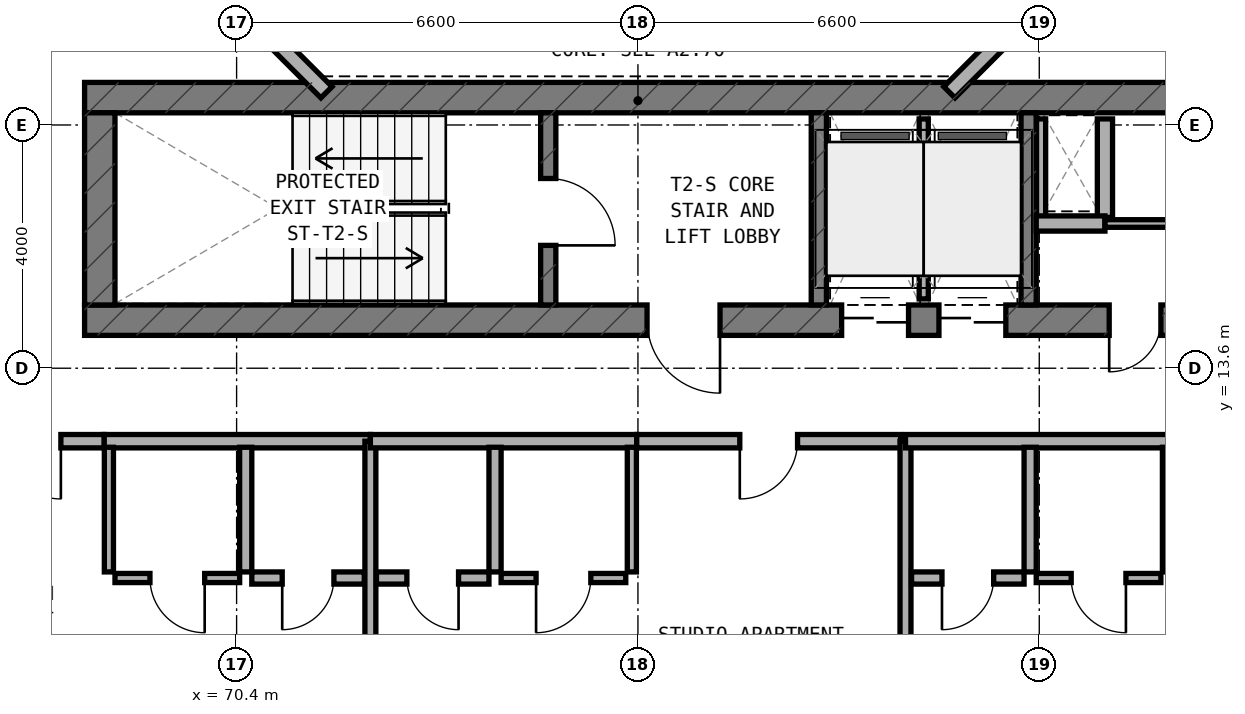
"""IFC4 building model, lengths in metres.
Left out: names, types, materials, properties, quantities, classifications, styles, units other than length and angle.
Written with IfcOpenShell. Run it as: python <this file> out.ifc"""

import sys

from ifc_helpers import new_model, si_unit, direction, frame, frame_2d, origin, place, context, subcontext, project, spatial, rectangle, extrude, element, fill, save


model = new_model("IFC4")
c1 = context("Model", 3, precision=1e-05, world=origin(), true_north=direction((0.0, 1.0)))
c2 = subcontext(c1, "Body", "Model", "MODEL_VIEW")
j1 = project(units=[si_unit("LENGTHUNIT", "METRE"), si_unit("PLANEANGLEUNIT", "RADIAN")], contexts=[c1])
p1 = place(None, origin())
s1 = spatial("IfcSite", under=j1, at=p1, CompositionType="ELEMENT")
p2 = place(p1, origin())
s2 = spatial("IfcBuilding", under=s1, at=p2, CompositionType="ELEMENT")
p3 = place(p2, frame((0.0, 0.0, 80.0)))
s3 = spatial("IfcBuildingStorey", under=s2, at=p3, CompositionType="ELEMENT", Elevation=80.0)
p4 = place(p3, frame((67.9, 14.39, 0.0), z_axis=(0.0, 0.0, 1.0), x_axis=(1.0, 0.0, 0.0)))
e1 = element("IfcWall", 1, at=p4, inside=s3, PredefinedType="SHEAR", context=c2, shape_type="SweptSolid", body=[
    extrude(rectangle(XDim=18.4, YDim=0.5, at=frame_2d((9.2, 0.0))), origin(), (0.0, 0.0, 1.0), 3.5),
])
p5 = place(p4, frame((9.25, 0.0, 0.0)))
e2 = element("IfcOpeningElement", 2, at=p5, cuts=e1, PredefinedType="OPENING", context=c2, shape_type="SweptSolid", body=[
    extrude(rectangle(XDim=1.2, YDim=2.15, at=frame_2d((0.6, 1.075))), frame((0.0, 0.26, 0.0), z_axis=(0.0, -1.0, 0.0), x_axis=(1.0, 0.0, 0.0)), (0.0, 0.0, 1.0), 0.52),
])
p6 = place(p4, frame((16.85, 0.0, 0.0)))
e3 = element("IfcOpeningElement", 3, at=p6, cuts=e1, PredefinedType="OPENING", context=c2, shape_type="SweptSolid", body=[
    extrude(rectangle(XDim=0.85, YDim=2.1, at=frame_2d((0.425, 1.05))), frame((0.0, 0.26, 0.0), z_axis=(0.0, -1.0, 0.0), x_axis=(1.0, 0.0, 0.0)), (0.0, 0.0, 1.0), 0.52),
])
p7 = place(p4, frame((12.45, 0.0, 0.0)))
e4 = element("IfcOpeningElement", 4, at=p7, cuts=e1, PredefinedType="OPENING", context=c2, shape_type="SweptSolid", body=[
    extrude(rectangle(XDim=1.1, YDim=2.15, at=frame_2d((0.55, 1.075))), frame((0.0, 0.26, 0.0), z_axis=(0.0, -1.0, 0.0), x_axis=(1.0, 0.0, 0.0)), (0.0, 0.0, 1.0), 0.52),
])
p8 = place(p4, frame((14.05, 0.0, 0.0)))
e5 = element("IfcOpeningElement", 5, at=p8, cuts=e1, PredefinedType="OPENING", context=c2, shape_type="SweptSolid", body=[
    extrude(rectangle(XDim=1.1, YDim=2.15, at=frame_2d((0.55, 1.075))), frame((0.0, 0.26, 0.0), z_axis=(0.0, -1.0, 0.0), x_axis=(1.0, 0.0, 0.0)), (0.0, 0.0, 1.0), 0.52),
])
p9 = place(p3, frame((67.9, 18.05, 0.0), z_axis=(0.0, 0.0, 1.0), x_axis=(1.0, 0.0, 0.0)))
e6 = element("IfcWall", 6, at=p9, inside=s3, PredefinedType="SHEAR", context=c2, shape_type="SweptSolid", body=[
    extrude(rectangle(XDim=18.4, YDim=0.5, at=frame_2d((9.2, 0.0))), origin(), (0.0, 0.0, 1.0), 3.5),
])
p10 = place(p3, frame((68.15, 14.64, 0.0), z_axis=(0.0, 0.0, 1.0), x_axis=(0.0, 1.0, 0.0)))
e7 = element("IfcWall", 7, at=p10, inside=s3, PredefinedType="SHEAR", context=c2, shape_type="SweptSolid", body=[
    extrude(rectangle(XDim=3.16, YDim=0.5, at=frame_2d((1.58, 0.0))), origin(), (0.0, 0.0, 1.0), 3.5),
])
p11 = place(p3, frame((75.525, 14.64, 0.0), z_axis=(0.0, 0.0, 1.0), x_axis=(0.0, 1.0, 0.0)))
e8 = element("IfcWall", 8, at=p11, inside=s3, PredefinedType="STANDARD", context=c2, shape_type="SweptSolid", body=[
    extrude(rectangle(XDim=3.16, YDim=0.25, at=frame_2d((1.58, 0.0))), origin(), (0.0, 0.0, 1.0), 3.25),
])
p12 = place(p11, frame((0.98, 0.0, 0.0)))
e9 = element("IfcOpeningElement", 9, at=p12, cuts=e8, PredefinedType="OPENING", context=c2, shape_type="SweptSolid", body=[
    extrude(rectangle(XDim=1.1, YDim=2.15, at=frame_2d((0.55, 1.075))), frame((0.0, 0.135, 0.0), z_axis=(0.0, -1.0, 0.0), x_axis=(1.0, 0.0, 0.0)), (0.0, 0.0, 1.0), 0.27),
])
for number, where, z_axis, x_axis in (
    (10, (79.975, 14.64, 0.0), (0.0, 0.0, 1.0), (0.0, 1.0, 0.0)),
    (11, (83.425, 14.64, 0.0), (0.0, 0.0, 1.0), (0.0, 1.0, 0.0)),
):
    element("IfcWall", number, at=place(p3, frame(where, z_axis=z_axis, x_axis=x_axis)), inside=s3, PredefinedType="STANDARD", context=c2, shape_type="SweptSolid", body=[
        extrude(rectangle(XDim=3.16, YDim=0.25, at=frame_2d((1.58, 0.0))), origin(), (0.0, 0.0, 1.0), 3.25),
    ])
for number, where, z_axis, x_axis in (
    (12, (82.122, 18.138, 0.0), (0.0, 0.0, 1.0), (0.707, 0.707, 0.0)),
    (13, (70.244, 19.772, 0.0), (0.0, 0.0, 1.0), (0.707, -0.707, 0.0)),
):
    element("IfcWall", number, at=place(p3, frame(where, z_axis=z_axis, x_axis=x_axis)), inside=s3, PredefinedType="STANDARD", context=c2, shape_type="SweptSolid", body=[
        extrude(rectangle(XDim=2.311, YDim=0.26, at=frame_2d((1.155, 0.0))), origin(), (0.0, 0.0, 1.0), 3.25),
    ])
p13 = place(p3, frame((83.63, 16.08, 0.0), z_axis=(0.0, 0.0, 1.0), x_axis=(0.0, 1.0, 0.0)))
e14 = element("IfcWall", 14, at=p13, inside=s3, PredefinedType="PARTITIONING", context=c2, shape_type="SweptSolid", body=[
    extrude(rectangle(XDim=1.62, YDim=0.15, at=frame_2d((0.81, 0.0))), origin(), (0.0, 0.0, 1.0), 2.825),
])
p14 = place(p3, frame((84.68, 16.08, 0.0), z_axis=(0.0, 0.0, 1.0), x_axis=(0.0, 1.0, 0.0)))
e15 = element("IfcWall", 15, at=p14, inside=s3, PredefinedType="SOLIDWALL", context=c2, shape_type="SweptSolid", body=[
    extrude(rectangle(XDim=1.62, YDim=0.25, at=frame_2d((0.81, 0.0))), origin(), (0.0, 0.0, 1.0), 3.22),
])
p15 = place(p3, frame((83.55, 15.98, 0.0), z_axis=(0.0, 0.0, 1.0), x_axis=(1.0, 0.0, 0.0)))
e16 = element("IfcWall", 16, at=p15, inside=s3, PredefinedType="SOLIDWALL", context=c2, shape_type="SweptSolid", body=[
    extrude(rectangle(XDim=1.13, YDim=0.25, at=frame_2d((0.565, 0.0))), origin(), (0.0, 0.0, 1.0), 3.22),
])
p16 = place(p3, frame((84.68, 15.98, 0.0), z_axis=(0.0, 0.0, 1.0), x_axis=(1.0, 0.0, 0.0)))
e17 = element("IfcWall", 17, at=p16, inside=s3, PredefinedType="PARTITIONING", context=c2, shape_type="SweptSolid", body=[
    extrude(rectangle(XDim=1.12, YDim=0.125, at=frame_2d((0.56, 0.0))), origin(), (0.0, 0.0, 1.0), 3.22),
])
p17 = place(p3, frame((81.7, 14.74, 0.0), z_axis=(0.0, 0.0, 1.0), x_axis=(0.0, 1.0, 0.0)))
e18 = element("IfcWall", 18, at=p17, inside=s3, PredefinedType="PARTITIONING", context=c2, shape_type="SweptSolid", body=[
    extrude(rectangle(XDim=2.96, YDim=0.15, at=frame_2d((1.48, 0.0))), origin(), (0.0, 0.0, 1.0), 3.22),
])
p18 = place(p3, frame((68.22, 12.4, 0.0), z_axis=(0.0, 0.0, 1.0), x_axis=(1.0, 0.0, 0.0)))
e19 = element("IfcWall", 19, at=p18, inside=s3, PredefinedType="SOLIDWALL", context=c2, shape_type="SweptSolid", body=[
    extrude(rectangle(XDim=4.38, YDim=0.22, at=frame_2d((2.19, 0.0))), origin(), (0.0, 0.0, 1.0), 2.825),
])
p19 = place(p3, frame((65.85, 12.4, 0.0), z_axis=(0.0, 0.0, 1.0), x_axis=(1.0, 0.0, 0.0)))
e20 = element("IfcWall", 20, at=p19, inside=s3, PredefinedType="SOLIDWALL", context=c2, shape_type="SweptSolid", body=[
    extrude(rectangle(XDim=2.37, YDim=0.22, at=frame_2d((1.185, 0.0))), origin(), (0.0, 0.0, 1.0), 3.22),
])
p20 = place(p19, frame((0.71, 0.0, 0.0)))
e21 = element("IfcOpeningElement", 21, at=p20, cuts=e20, PredefinedType="OPENING", context=c2, shape_type="SweptSolid", body=[
    extrude(rectangle(XDim=0.95, YDim=2.1, at=frame_2d((0.475, 1.05))), frame((0.0, 0.12, 0.0), z_axis=(0.0, -1.0, 0.0), x_axis=(1.0, 0.0, 0.0)), (0.0, 0.0, 1.0), 0.24),
])
p21 = place(p3, frame((70.55, 10.25, 0.0), z_axis=(0.0, 0.0, 1.0), x_axis=(0.0, 1.0, 0.0)))
e22 = element("IfcWall", 22, at=p21, inside=s3, PredefinedType="PLUMBINGWALL", context=c2, shape_type="SweptSolid", body=[
    extrude(rectangle(XDim=2.05, YDim=0.2, at=frame_2d((1.025, 0.0))), origin(), (0.0, 0.0, 1.0), 3.22),
])
p22 = place(p3, frame((68.3, 10.25, 0.0), z_axis=(0.0, 0.0, 1.0), x_axis=(0.0, 1.0, 0.0)))
e23 = element("IfcWall", 23, at=p22, inside=s3, PredefinedType="PARTITIONING", context=c2, shape_type="SweptSolid", body=[
    extrude(rectangle(XDim=2.05, YDim=0.15, at=frame_2d((1.025, 0.0))), origin(), (0.0, 0.0, 1.0), 3.22),
])
p23 = place(p3, frame((70.65, 10.15, 0.0), z_axis=(0.0, 0.0, 1.0), x_axis=(1.0, 0.0, 0.0)))
e24 = element("IfcWall", 24, at=p23, inside=s3, PredefinedType="PLUMBINGWALL", context=c2, shape_type="SweptSolid", body=[
    extrude(rectangle(XDim=1.85, YDim=0.2, at=frame_2d((0.925, 0.0))), origin(), (0.0, 0.0, 1.0), 3.22),
])
p24 = place(p23, frame((0.5, 0.0, 0.0)))
e25 = element("IfcOpeningElement", 25, at=p24, cuts=e24, PredefinedType="OPENING", context=c2, shape_type="SweptSolid", body=[
    extrude(rectangle(XDim=0.85, YDim=2.1, at=frame_2d((0.425, 1.05))), frame((0.0, 0.11, 0.0), z_axis=(0.0, -1.0, 0.0), x_axis=(1.0, 0.0, 0.0)), (0.0, 0.0, 1.0), 0.22),
])
p25 = place(p3, frame((68.4, 10.15, 0.0), z_axis=(0.0, 0.0, 1.0), x_axis=(1.0, 0.0, 0.0)))
e26 = element("IfcWall", 26, at=p25, inside=s3, PredefinedType="PARTITIONING", context=c2, shape_type="SweptSolid", body=[
    extrude(rectangle(XDim=2.05, YDim=0.15, at=frame_2d((1.025, 0.0))), origin(), (0.0, 0.0, 1.0), 3.22),
])
p26 = place(p25, frame((0.575, 0.0, 0.0)))
e27 = element("IfcOpeningElement", 27, at=p26, cuts=e26, PredefinedType="OPENING", context=c2, shape_type="SweptSolid", body=[
    extrude(rectangle(XDim=0.9, YDim=2.1, at=frame_2d((0.45, 1.05))), frame((0.0, 0.085, 0.0), z_axis=(0.0, -1.0, 0.0), x_axis=(1.0, 0.0, 0.0)), (0.0, 0.0, 1.0), 0.17),
])
p27 = place(p3, frame((72.6, 6.66, 0.0), z_axis=(0.0, 0.0, 1.0), x_axis=(0.0, 1.0, 0.0)))
e28 = element("IfcWall", 28, at=p27, inside=s3, PredefinedType="SOLIDWALL", context=c2, shape_type="SweptSolid", body=[
    extrude(rectangle(XDim=5.74, YDim=0.18, at=frame_2d((2.87, 0.0))), origin(), (0.0, 0.0, 1.0), 2.825),
])
p28 = place(p3, frame((72.6, 12.4, 0.0), z_axis=(0.0, 0.0, 1.0), x_axis=(1.0, 0.0, 0.0)))
e29 = element("IfcWall", 29, at=p28, inside=s3, PredefinedType="SOLIDWALL", context=c2, shape_type="SweptSolid", body=[
    extrude(rectangle(XDim=4.38, YDim=0.22, at=frame_2d((2.19, 0.0))), origin(), (0.0, 0.0, 1.0), 2.825),
])
p29 = place(p3, frame((76.98, 12.4, 0.0), z_axis=(0.0, 0.0, 1.0), x_axis=(1.0, 0.0, 0.0)))
e30 = element("IfcWall", 30, at=p29, inside=s3, PredefinedType="SOLIDWALL", context=c2, shape_type="SweptSolid", body=[
    extrude(rectangle(XDim=4.34, YDim=0.22, at=frame_2d((2.17, 0.0))), origin(), (0.0, 0.0, 1.0), 2.825),
])
p30 = place(p29, frame((1.695, 0.0, 0.0)))
e31 = element("IfcOpeningElement", 31, at=p30, cuts=e30, PredefinedType="OPENING", context=c2, shape_type="SweptSolid", body=[
    extrude(rectangle(XDim=0.95, YDim=2.1, at=frame_2d((0.475, 1.05))), frame((0.0, 0.12, 0.0), z_axis=(0.0, -1.0, 0.0), x_axis=(1.0, 0.0, 0.0)), (0.0, 0.0, 1.0), 0.24),
])
p31 = place(p3, frame((74.65, 10.25, 0.0), z_axis=(0.0, 0.0, 1.0), x_axis=(0.0, 1.0, 0.0)))
e32 = element("IfcWall", 32, at=p31, inside=s3, PredefinedType="PLUMBINGWALL", context=c2, shape_type="SweptSolid", body=[
    extrude(rectangle(XDim=2.05, YDim=0.2, at=frame_2d((1.025, 0.0))), origin(), (0.0, 0.0, 1.0), 2.825),
])
p32 = place(p3, frame((76.9, 10.25, 0.0), z_axis=(0.0, 0.0, 1.0), x_axis=(0.0, 1.0, 0.0)))
e33 = element("IfcWall", 33, at=p32, inside=s3, PredefinedType="PARTITIONING", context=c2, shape_type="SweptSolid", body=[
    extrude(rectangle(XDim=2.05, YDim=0.15, at=frame_2d((1.025, 0.0))), origin(), (0.0, 0.0, 1.0), 2.825),
])
p33 = place(p3, frame((72.7, 10.15, 0.0), z_axis=(0.0, 0.0, 1.0), x_axis=(1.0, 0.0, 0.0)))
e34 = element("IfcWall", 34, at=p33, inside=s3, PredefinedType="PLUMBINGWALL", context=c2, shape_type="SweptSolid", body=[
    extrude(rectangle(XDim=1.85, YDim=0.2, at=frame_2d((0.925, 0.0))), origin(), (0.0, 0.0, 1.0), 3.22),
])
p34 = place(p33, frame((0.5, 0.0, 0.0)))
e35 = element("IfcOpeningElement", 35, at=p34, cuts=e34, PredefinedType="OPENING", context=c2, shape_type="SweptSolid", body=[
    extrude(rectangle(XDim=0.85, YDim=2.1, at=frame_2d((0.425, 1.05))), frame((0.0, 0.11, 0.0), z_axis=(0.0, -1.0, 0.0), x_axis=(1.0, 0.0, 0.0)), (0.0, 0.0, 1.0), 0.22),
])
p35 = place(p3, frame((74.75, 10.15, 0.0), z_axis=(0.0, 0.0, 1.0), x_axis=(1.0, 0.0, 0.0)))
e36 = element("IfcWall", 36, at=p35, inside=s3, PredefinedType="PARTITIONING", context=c2, shape_type="SweptSolid", body=[
    extrude(rectangle(XDim=2.05, YDim=0.15, at=frame_2d((1.025, 0.0))), origin(), (0.0, 0.0, 1.0), 3.22),
])
p36 = place(p35, frame((0.575, 0.0, 0.0)))
e37 = element("IfcOpeningElement", 37, at=p36, cuts=e36, PredefinedType="OPENING", context=c2, shape_type="SweptSolid", body=[
    extrude(rectangle(XDim=0.9, YDim=2.1, at=frame_2d((0.45, 1.05))), frame((0.0, 0.085, 0.0), z_axis=(0.0, -1.0, 0.0), x_axis=(1.0, 0.0, 0.0)), (0.0, 0.0, 1.0), 0.17),
])
p37 = place(p3, frame((81.4, 6.66, 0.0), z_axis=(0.0, 0.0, 1.0), x_axis=(0.0, 1.0, 0.0)))
e38 = element("IfcWall", 38, at=p37, inside=s3, PredefinedType="SOLIDWALL", context=c2, shape_type="SweptSolid", body=[
    extrude(rectangle(XDim=5.74, YDim=0.18, at=frame_2d((2.87, 0.0))), origin(), (0.0, 0.0, 1.0), 2.825),
])
p38 = place(p3, frame((81.4, 12.4, 0.0), z_axis=(0.0, 0.0, 1.0), x_axis=(1.0, 0.0, 0.0)))
e39 = element("IfcWall", 39, at=p38, inside=s3, PredefinedType="SOLIDWALL", context=c2, shape_type="SweptSolid", body=[
    extrude(rectangle(XDim=4.38, YDim=0.22, at=frame_2d((2.19, 0.0))), origin(), (0.0, 0.0, 1.0), 2.825),
])
p39 = place(p3, frame((83.45, 10.25, 0.0), z_axis=(0.0, 0.0, 1.0), x_axis=(0.0, 1.0, 0.0)))
e40 = element("IfcWall", 40, at=p39, inside=s3, PredefinedType="PLUMBINGWALL", context=c2, shape_type="SweptSolid", body=[
    extrude(rectangle(XDim=2.05, YDim=0.2, at=frame_2d((1.025, 0.0))), origin(), (0.0, 0.0, 1.0), 3.22),
])
p40 = place(p3, frame((85.7, 10.25, 0.0), z_axis=(0.0, 0.0, 1.0), x_axis=(0.0, 1.0, 0.0)))
e41 = element("IfcWall", 41, at=p40, inside=s3, PredefinedType="PARTITIONING", context=c2, shape_type="SweptSolid", body=[
    extrude(rectangle(XDim=2.05, YDim=0.15, at=frame_2d((1.025, 0.0))), origin(), (0.0, 0.0, 1.0), 3.22),
])
p41 = place(p3, frame((81.5, 10.15, 0.0), z_axis=(0.0, 0.0, 1.0), x_axis=(1.0, 0.0, 0.0)))
e42 = element("IfcWall", 42, at=p41, inside=s3, PredefinedType="PLUMBINGWALL", context=c2, shape_type="SweptSolid", body=[
    extrude(rectangle(XDim=1.85, YDim=0.2, at=frame_2d((0.925, 0.0))), origin(), (0.0, 0.0, 1.0), 2.825),
])
p42 = place(p41, frame((0.5, 0.0, 0.0)))
e43 = element("IfcOpeningElement", 43, at=p42, cuts=e42, PredefinedType="OPENING", context=c2, shape_type="SweptSolid", body=[
    extrude(rectangle(XDim=0.85, YDim=2.1, at=frame_2d((0.425, 1.05))), frame((0.0, 0.11, 0.0), z_axis=(0.0, -1.0, 0.0), x_axis=(1.0, 0.0, 0.0)), (0.0, 0.0, 1.0), 0.22),
])
p43 = place(p3, frame((83.55, 10.15, 0.0), z_axis=(0.0, 0.0, 1.0), x_axis=(1.0, 0.0, 0.0)))
e44 = element("IfcWall", 44, at=p43, inside=s3, PredefinedType="PARTITIONING", context=c2, shape_type="SweptSolid", body=[
    extrude(rectangle(XDim=2.05, YDim=0.15, at=frame_2d((1.025, 0.0))), origin(), (0.0, 0.0, 1.0), 3.22),
])
p44 = place(p43, frame((0.575, 0.0, 0.0)))
e45 = element("IfcOpeningElement", 45, at=p44, cuts=e44, PredefinedType="OPENING", context=c2, shape_type="SweptSolid", body=[
    extrude(rectangle(XDim=0.9, YDim=2.1, at=frame_2d((0.45, 1.05))), frame((0.0, 0.085, 0.0), z_axis=(0.0, -1.0, 0.0), x_axis=(1.0, 0.0, 0.0)), (0.0, 0.0, 1.0), 0.17),
])
p45 = place(p12, frame((1.1, 0.0, 0.0), z_axis=(0.0, 0.0, 1.0), x_axis=(-1.0, 0.0, 0.0)))
e46 = element("IfcDoor", 46, at=p45, inside=s3, OperationType="SINGLE_SWING_RIGHT", PredefinedType="DOOR", context=c2, shape_type="SweptSolid", body=[
    extrude(rectangle(XDim=1.1, YDim=2.15, at=frame_2d((0.55, 1.075))), frame((0.0, 0.025, 0.0), z_axis=(0.0, -1.0, 0.0), x_axis=(1.0, 0.0, 0.0)), (0.0, 0.0, 1.0), 0.05),
])
fill(e9, e46)
p46 = place(p5, frame((1.2, 0.0, 0.0), z_axis=(0.0, 0.0, 1.0), x_axis=(-1.0, 0.0, 0.0)))
e47 = element("IfcDoor", 47, at=p46, inside=s3, OperationType="SINGLE_SWING_LEFT", PredefinedType="DOOR", context=c2, shape_type="SweptSolid", body=[
    extrude(rectangle(XDim=1.2, YDim=2.15, at=frame_2d((0.6, 1.075))), frame((0.0, 0.025, 0.0), z_axis=(0.0, -1.0, 0.0), x_axis=(1.0, 0.0, 0.0)), (0.0, 0.0, 1.0), 0.05),
])
fill(e2, e47)
p47 = place(p6, frame((0.85, 0.0, 0.0), z_axis=(0.0, 0.0, 1.0), x_axis=(-1.0, 0.0, 0.0)))
e48 = element("IfcDoor", 48, at=p47, inside=s3, OperationType="SINGLE_SWING_RIGHT", PredefinedType="DOOR", context=c2, shape_type="SweptSolid", body=[
    extrude(rectangle(XDim=0.85, YDim=2.1, at=frame_2d((0.425, 1.05))), frame((0.0, 0.025, 0.0), z_axis=(0.0, -1.0, 0.0), x_axis=(1.0, 0.0, 0.0)), (0.0, 0.0, 1.0), 0.05),
])
fill(e3, e48)
p48 = place(p7, frame((1.1, 0.0, 0.0), z_axis=(0.0, 0.0, 1.0), x_axis=(-1.0, 0.0, 0.0)))
e49 = element("IfcDoor", 49, at=p48, inside=s3, OperationType="DOUBLE_DOOR_SLIDING", PredefinedType="DOOR", context=c2, shape_type="SweptSolid", body=[
    extrude(rectangle(XDim=1.1, YDim=2.15, at=frame_2d((0.55, 1.075))), frame((0.0, 0.025, 0.0), z_axis=(0.0, -1.0, 0.0), x_axis=(1.0, 0.0, 0.0)), (0.0, 0.0, 1.0), 0.05),
])
fill(e4, e49)
p49 = place(p8, frame((1.1, 0.0, 0.0), z_axis=(0.0, 0.0, 1.0), x_axis=(-1.0, 0.0, 0.0)))
e50 = element("IfcDoor", 50, at=p49, inside=s3, OperationType="DOUBLE_DOOR_SLIDING", PredefinedType="DOOR", context=c2, shape_type="SweptSolid", body=[
    extrude(rectangle(XDim=1.1, YDim=2.15, at=frame_2d((0.55, 1.075))), frame((0.0, 0.025, 0.0), z_axis=(0.0, -1.0, 0.0), x_axis=(1.0, 0.0, 0.0)), (0.0, 0.0, 1.0), 0.05),
])
fill(e5, e50)
p50 = place(p20, frame((0.95, 0.0, 0.0), z_axis=(0.0, 0.0, 1.0), x_axis=(-1.0, 0.0, 0.0)))
e51 = element("IfcDoor", 51, at=p50, inside=s3, OperationType="SINGLE_SWING_LEFT", PredefinedType="DOOR", context=c2, shape_type="SweptSolid", body=[
    extrude(rectangle(XDim=0.95, YDim=2.1, at=frame_2d((0.475, 1.05))), frame((0.0, 0.025, 0.0), z_axis=(0.0, -1.0, 0.0), x_axis=(1.0, 0.0, 0.0)), (0.0, 0.0, 1.0), 0.05),
])
fill(e21, e51)
p51 = place(p24, frame((0.85, 0.0, 0.0), z_axis=(0.0, 0.0, 1.0), x_axis=(-1.0, 0.0, 0.0)))
e52 = element("IfcDoor", 52, at=p51, inside=s3, OperationType="SINGLE_SWING_RIGHT", PredefinedType="DOOR", context=c2, shape_type="SweptSolid", body=[
    extrude(rectangle(XDim=0.85, YDim=2.1, at=frame_2d((0.425, 1.05))), frame((0.0, 0.025, 0.0), z_axis=(0.0, -1.0, 0.0), x_axis=(1.0, 0.0, 0.0)), (0.0, 0.0, 1.0), 0.05),
])
fill(e25, e52)
p52 = place(p26, frame((0.9, 0.0, 0.0), z_axis=(0.0, 0.0, 1.0), x_axis=(-1.0, 0.0, 0.0)))
e53 = element("IfcDoor", 53, at=p52, inside=s3, OperationType="SINGLE_SWING_LEFT", PredefinedType="DOOR", context=c2, shape_type="SweptSolid", body=[
    extrude(rectangle(XDim=0.9, YDim=2.1, at=frame_2d((0.45, 1.05))), frame((0.0, 0.025, 0.0), z_axis=(0.0, -1.0, 0.0), x_axis=(1.0, 0.0, 0.0)), (0.0, 0.0, 1.0), 0.05),
])
fill(e27, e53)
p53 = place(p30, frame((0.95, 0.0, 0.0), z_axis=(0.0, 0.0, 1.0), x_axis=(-1.0, 0.0, 0.0)))
e54 = element("IfcDoor", 54, at=p53, inside=s3, OperationType="SINGLE_SWING_RIGHT", PredefinedType="DOOR", context=c2, shape_type="SweptSolid", body=[
    extrude(rectangle(XDim=0.95, YDim=2.1, at=frame_2d((0.475, 1.05))), frame((0.0, 0.025, 0.0), z_axis=(0.0, -1.0, 0.0), x_axis=(1.0, 0.0, 0.0)), (0.0, 0.0, 1.0), 0.05),
])
fill(e31, e54)
p54 = place(p34, frame((0.85, 0.0, 0.0), z_axis=(0.0, 0.0, 1.0), x_axis=(-1.0, 0.0, 0.0)))
e55 = element("IfcDoor", 55, at=p54, inside=s3, OperationType="SINGLE_SWING_LEFT", PredefinedType="DOOR", context=c2, shape_type="SweptSolid", body=[
    extrude(rectangle(XDim=0.85, YDim=2.1, at=frame_2d((0.425, 1.05))), frame((0.0, 0.025, 0.0), z_axis=(0.0, -1.0, 0.0), x_axis=(1.0, 0.0, 0.0)), (0.0, 0.0, 1.0), 0.05),
])
fill(e35, e55)
p55 = place(p36, frame((0.9, 0.0, 0.0), z_axis=(0.0, 0.0, 1.0), x_axis=(-1.0, 0.0, 0.0)))
e56 = element("IfcDoor", 56, at=p55, inside=s3, OperationType="SINGLE_SWING_RIGHT", PredefinedType="DOOR", context=c2, shape_type="SweptSolid", body=[
    extrude(rectangle(XDim=0.9, YDim=2.1, at=frame_2d((0.45, 1.05))), frame((0.0, 0.025, 0.0), z_axis=(0.0, -1.0, 0.0), x_axis=(1.0, 0.0, 0.0)), (0.0, 0.0, 1.0), 0.05),
])
fill(e37, e56)
p56 = place(p42, frame((0.85, 0.0, 0.0), z_axis=(0.0, 0.0, 1.0), x_axis=(-1.0, 0.0, 0.0)))
e57 = element("IfcDoor", 57, at=p56, inside=s3, OperationType="SINGLE_SWING_RIGHT", PredefinedType="DOOR", context=c2, shape_type="SweptSolid", body=[
    extrude(rectangle(XDim=0.85, YDim=2.1, at=frame_2d((0.425, 1.05))), frame((0.0, 0.025, 0.0), z_axis=(0.0, -1.0, 0.0), x_axis=(1.0, 0.0, 0.0)), (0.0, 0.0, 1.0), 0.05),
])
fill(e43, e57)
p57 = place(p44, frame((0.9, 0.0, 0.0), z_axis=(0.0, 0.0, 1.0), x_axis=(-1.0, 0.0, 0.0)))
e58 = element("IfcDoor", 58, at=p57, inside=s3, OperationType="SINGLE_SWING_LEFT", PredefinedType="DOOR", context=c2, shape_type="SweptSolid", body=[
    extrude(rectangle(XDim=0.9, YDim=2.1, at=frame_2d((0.45, 1.05))), frame((0.0, 0.025, 0.0), z_axis=(0.0, -1.0, 0.0), x_axis=(1.0, 0.0, 0.0)), (0.0, 0.0, 1.0), 0.05),
])
fill(e45, e58)
save(model, sys.argv[1])
